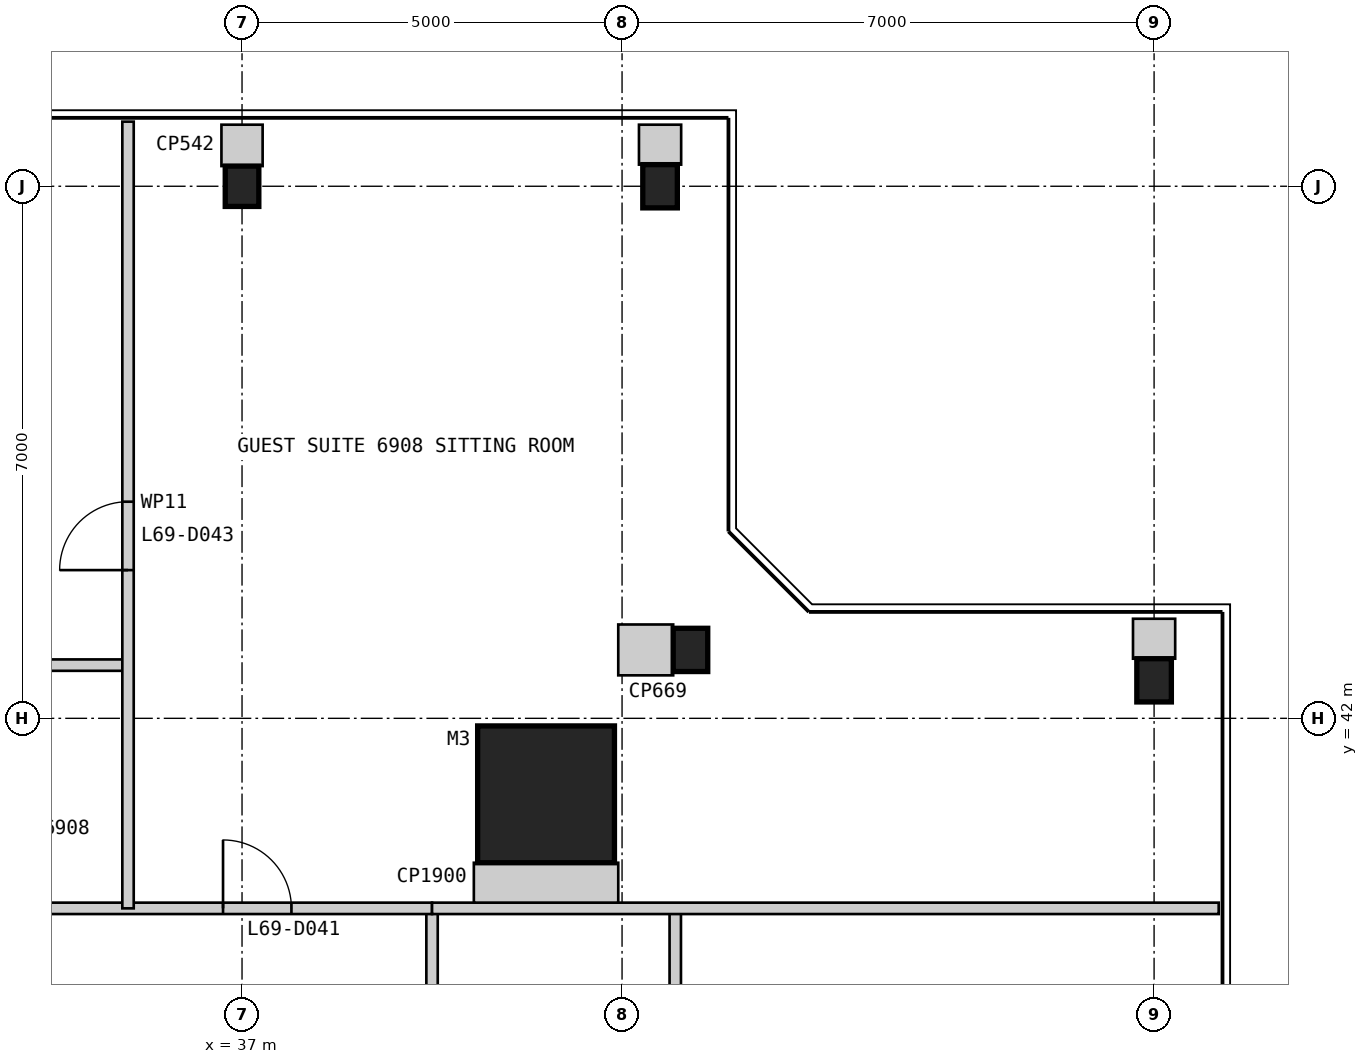
"""IFC4 building model, lengths in metres.
Left out: names, types, materials, properties, quantities, classifications, styles, units other than length and angle.
Written with IfcOpenShell. Run it as: python <this file> out.ifc"""

import sys

from ifc_helpers import new_model, si_unit, direction, frame, frame_2d, origin, origin_2d, place, context, subcontext, project, spatial, rectangle, i_section, extrude, element, fill, save


model = new_model("IFC4")
c1 = context("Model", 3, precision=1e-05, world=origin(), true_north=direction((0.0, 1.0)))
c2 = subcontext(c1, "Body", "Model", "MODEL_VIEW")
j1 = project(units=[si_unit("LENGTHUNIT", "METRE"), si_unit("PLANEANGLEUNIT", "RADIAN")], contexts=[c1])
p1 = place(None, origin())
s1 = spatial("IfcSite", under=j1, at=p1, CompositionType="ELEMENT")
p2 = place(p1, origin())
s2 = spatial("IfcBuilding", under=s1, at=p2, CompositionType="ELEMENT")
p3 = place(p2, frame((0.0, 0.0, 286.6)))
s3 = spatial("IfcBuildingStorey", under=s2, at=p3, CompositionType="ELEMENT", Elevation=286.6)
p4 = place(p3, frame((41.0, 41.0, 0.0), z_axis=(0.0, 0.0, 1.0), x_axis=(1.0, 0.0, 0.0)))
e1 = element("IfcColumn", 1, at=p4, inside=s3, PredefinedType="COLUMN", context=c2, shape_type="SweptSolid", body=[
    extrude(rectangle(XDim=1.8, YDim=1.8, at=origin_2d()), origin(), (0.0, 0.0, 1.0), 3.4),
])
for number, where, z_axis, x_axis in (
    (2, (49.0, 42.5, 0.0), (0.0, 0.0, 1.0), (1.0, 0.0, 0.0)),
    (3, (42.9, 42.9, 0.0), (0.0, 0.0, 1.0), (1.0, 0.0, 0.0)),
    (4, (42.5, 49.0, 0.0), (0.0, 0.0, 1.0), (1.0, 0.0, 0.0)),
):
    element("IfcColumn", number, at=place(p3, frame(where, z_axis=z_axis, x_axis=x_axis)), inside=s3, PredefinedType="COLUMN", context=c2, shape_type="SweptSolid", body=[
        extrude(i_section(OverallWidth=0.455, OverallDepth=0.569, WebThickness=0.078, FlangeThickness=0.125, at=origin_2d()), origin(), (0.0, 0.0, 1.0), 3.4),
    ])
p5 = place(p3, frame((37.0, 49.0, 0.0), z_axis=(0.0, 0.0, 1.0), x_axis=(1.0, 0.0, 0.0)))
e5 = element("IfcColumn", 5, at=p5, inside=s3, PredefinedType="COLUMN", context=c2, shape_type="SweptSolid", body=[
    extrude(i_section(OverallWidth=0.442, OverallDepth=0.531, WebThickness=0.066, FlangeThickness=0.106, at=origin_2d()), origin(), (0.0, 0.0, 1.0), 3.4),
])
p6 = place(p3, frame((39.5, 10.5, 0.0), z_axis=(0.0, 0.0, 1.0), x_axis=(0.0, 1.0, 0.0)))
e6 = element("IfcWall", 6, at=p6, inside=s3, PredefinedType="PARTITIONING", context=c2, shape_type="SweptSolid", body=[
    extrude(rectangle(XDim=29.0, YDim=0.15, at=frame_2d((14.5, 0.0))), origin(), (0.0, 0.0, 1.0), 3.25),
])
p7 = place(p6, frame((2.775, 0.0, 0.0)))
e7 = element("IfcOpeningElement", 7, at=p7, cuts=e6, PredefinedType="OPENING", context=c2, shape_type="SweptSolid", body=[
    extrude(rectangle(XDim=0.9, YDim=2.1, at=frame_2d((0.45, 1.05))), frame((0.0, 0.085, 0.0), z_axis=(0.0, -1.0, 0.0), x_axis=(1.0, 0.0, 0.0)), (0.0, 0.0, 1.0), 0.17),
])
p8 = place(p6, frame((11.1, 0.0, 0.0)))
e8 = element("IfcOpeningElement", 8, at=p8, cuts=e6, PredefinedType="OPENING", context=c2, shape_type="SweptSolid", body=[
    extrude(rectangle(XDim=0.9, YDim=2.1, at=frame_2d((0.45, 1.05))), frame((0.0, 0.085, 0.0), z_axis=(0.0, -1.0, 0.0), x_axis=(1.0, 0.0, 0.0)), (0.0, 0.0, 1.0), 0.17),
])
p9 = place(p6, frame((17.2, 0.0, 0.0)))
e9 = element("IfcOpeningElement", 9, at=p9, cuts=e6, PredefinedType="OPENING", context=c2, shape_type="SweptSolid", body=[
    extrude(rectangle(XDim=1.0, YDim=2.1, at=frame_2d((0.5, 1.05))), frame((0.0, 0.085, 0.0), z_axis=(0.0, -1.0, 0.0), x_axis=(1.0, 0.0, 0.0)), (0.0, 0.0, 1.0), 0.17),
])
p10 = place(p6, frame((24.5, 0.0, 0.0)))
e10 = element("IfcOpeningElement", 10, at=p10, cuts=e6, PredefinedType="OPENING", context=c2, shape_type="SweptSolid", body=[
    extrude(rectangle(XDim=0.9, YDim=2.1, at=frame_2d((0.45, 1.05))), frame((0.0, 0.085, 0.0), z_axis=(0.0, -1.0, 0.0), x_axis=(1.0, 0.0, 0.0)), (0.0, 0.0, 1.0), 0.17),
])
p11 = place(p3, frame((42.7, 36.5, 0.0), z_axis=(0.0, 0.0, 1.0), x_axis=(0.0, 1.0, 0.0)))
e11 = element("IfcWall", 11, at=p11, inside=s3, PredefinedType="PARTITIONING", context=c2, shape_type="SweptSolid", body=[
    extrude(rectangle(XDim=3.0, YDim=0.15, at=frame_2d((1.5, 0.0))), origin(), (0.0, 0.0, 1.0), 3.25),
])
p12 = place(p3, frame((39.5, 39.5, 0.0), z_axis=(0.0, 0.0, 1.0), x_axis=(-1.0, 0.0, 0.0)))
e12 = element("IfcWall", 12, at=p12, inside=s3, PredefinedType="PARTITIONING", context=c2, shape_type="SweptSolid", body=[
    extrude(rectangle(XDim=29.0, YDim=0.15, at=frame_2d((14.5, 0.0))), origin(), (0.0, 0.0, 1.0), 3.25),
])
p13 = place(p12, frame((1.85, 0.0, 0.0)))
e13 = element("IfcOpeningElement", 13, at=p13, cuts=e12, PredefinedType="OPENING", context=c2, shape_type="SweptSolid", body=[
    extrude(rectangle(XDim=0.9, YDim=2.1, at=frame_2d((0.45, 1.05))), frame((0.0, 0.085, 0.0), z_axis=(0.0, -1.0, 0.0), x_axis=(1.0, 0.0, 0.0)), (0.0, 0.0, 1.0), 0.17),
])
p14 = place(p12, frame((11.5, 0.0, 0.0)))
e14 = element("IfcOpeningElement", 14, at=p14, cuts=e12, PredefinedType="OPENING", context=c2, shape_type="SweptSolid", body=[
    extrude(rectangle(XDim=0.9, YDim=2.1, at=frame_2d((0.45, 1.05))), frame((0.0, 0.085, 0.0), z_axis=(0.0, -1.0, 0.0), x_axis=(1.0, 0.0, 0.0)), (0.0, 0.0, 1.0), 0.17),
])
p15 = place(p12, frame((24.1, 0.0, 0.0)))
e15 = element("IfcOpeningElement", 15, at=p15, cuts=e12, PredefinedType="OPENING", context=c2, shape_type="SweptSolid", body=[
    extrude(rectangle(XDim=0.9, YDim=2.1, at=frame_2d((0.45, 1.05))), frame((0.0, 0.085, 0.0), z_axis=(0.0, -1.0, 0.0), x_axis=(1.0, 0.0, 0.0)), (0.0, 0.0, 1.0), 0.17),
])
p16 = place(p3, frame((49.85, 39.5, 0.0), z_axis=(0.0, 0.0, 1.0), x_axis=(-1.0, 0.0, 0.0)))
e16 = element("IfcWall", 16, at=p16, inside=s3, PredefinedType="PARTITIONING", context=c2, shape_type="SweptSolid", body=[
    extrude(rectangle(XDim=10.35, YDim=0.15, at=frame_2d((5.175, 0.0))), origin(), (0.0, 0.0, 1.0), 3.25),
])
p17 = place(p3, frame((35.5, 42.7, 0.0), z_axis=(0.0, 0.0, 1.0), x_axis=(-1.0, 0.0, 0.0)))
e17 = element("IfcWall", 17, at=p17, inside=s3, PredefinedType="PARTITIONING", context=c2, shape_type="SweptSolid", body=[
    extrude(rectangle(XDim=3.0, YDim=0.15, at=frame_2d((1.5, 0.0))), origin(), (0.0, 0.0, 1.0), 3.25),
])
p18 = place(p3, frame((35.5, 49.85, 0.0), z_axis=(0.0, 0.0, 1.0), x_axis=(0.0, -1.0, 0.0)))
e18 = element("IfcWall", 18, at=p18, inside=s3, PredefinedType="PARTITIONING", context=c2, shape_type="SweptSolid", body=[
    extrude(rectangle(XDim=10.35, YDim=0.15, at=frame_2d((5.175, 0.0))), origin(), (0.0, 0.0, 1.0), 3.25),
])
p19 = place(p18, frame((5.0, 0.0, 0.0)))
e19 = element("IfcOpeningElement", 19, at=p19, cuts=e18, PredefinedType="OPENING", context=c2, shape_type="SweptSolid", body=[
    extrude(rectangle(XDim=0.9, YDim=2.1, at=frame_2d((0.45, 1.05))), frame((0.0, 0.085, 0.0), z_axis=(0.0, -1.0, 0.0), x_axis=(1.0, 0.0, 0.0)), (0.0, 0.0, 1.0), 0.17),
])
p20 = place(p3, frame((41.0, 39.575, 0.0), z_axis=(0.0, 0.0, 1.0), x_axis=(0.0, 1.0, 0.0)))
e20 = element("IfcWall", 20, at=p20, inside=s3, PredefinedType="PARTITIONING", context=c2, shape_type="SweptSolid", body=[
    extrude(rectangle(XDim=0.525, YDim=1.9, at=frame_2d((0.263, 0.0))), origin(), (0.0, 0.0, 1.0), 3.25),
])
p21 = place(p3, frame((49.0, 43.31, 0.0), z_axis=(0.0, 0.0, 1.0), x_axis=(0.0, -1.0, 0.0)))
e21 = element("IfcWall", 21, at=p21, inside=s3, PredefinedType="PARTITIONING", context=c2, shape_type="SweptSolid", body=[
    extrude(rectangle(XDim=0.526, YDim=0.555, at=frame_2d((0.263, 0.0))), origin(), (0.0, 0.0, 1.0), 3.25),
])
p22 = place(p3, frame((41.95, 42.9, 0.0), z_axis=(0.0, 0.0, 1.0), x_axis=(1.0, 0.0, 0.0)))
e22 = element("IfcWall", 22, at=p22, inside=s3, PredefinedType="PARTITIONING", context=c2, shape_type="SweptSolid", body=[
    extrude(rectangle(XDim=0.723, YDim=0.669, at=frame_2d((0.361, 0.0))), origin(), (0.0, 0.0, 1.0), 3.25),
])
p23 = place(p3, frame((42.5, 49.81, 0.0), z_axis=(0.0, 0.0, 1.0), x_axis=(0.0, -1.0, 0.0)))
e23 = element("IfcWall", 23, at=p23, inside=s3, PredefinedType="PARTITIONING", context=c2, shape_type="SweptSolid", body=[
    extrude(rectangle(XDim=0.526, YDim=0.555, at=frame_2d((0.263, 0.0))), origin(), (0.0, 0.0, 1.0), 3.25),
])
p24 = place(p3, frame((37.0, 49.81, 0.0), z_axis=(0.0, 0.0, 1.0), x_axis=(0.0, -1.0, 0.0)))
e24 = element("IfcWall", 24, at=p24, inside=s3, PredefinedType="PARTITIONING", context=c2, shape_type="SweptSolid", body=[
    extrude(rectangle(XDim=0.545, YDim=0.542, at=frame_2d((0.272, 0.0))), origin(), (0.0, 0.0, 1.0), 3.25),
])
p25 = place(p13, frame((0.9, 0.0, 0.0), z_axis=(0.0, 0.0, 1.0), x_axis=(-1.0, 0.0, 0.0)))
e25 = element("IfcDoor", 25, at=p25, inside=s3, OperationType="SINGLE_SWING_LEFT", PredefinedType="DOOR", context=c2, shape_type="SweptSolid", body=[
    extrude(rectangle(XDim=0.9, YDim=2.1, at=frame_2d((0.45, 1.05))), frame((0.0, 0.025, 0.0), z_axis=(0.0, -1.0, 0.0), x_axis=(1.0, 0.0, 0.0)), (0.0, 0.0, 1.0), 0.05),
])
fill(e13, e25)
p26 = place(p19, frame((0.9, 0.0, 0.0), z_axis=(0.0, 0.0, 1.0), x_axis=(-1.0, 0.0, 0.0)))
e26 = element("IfcDoor", 26, at=p26, inside=s3, OperationType="SINGLE_SWING_LEFT", PredefinedType="DOOR", context=c2, shape_type="SweptSolid", body=[
    extrude(rectangle(XDim=0.9, YDim=2.1, at=frame_2d((0.45, 1.05))), frame((0.0, 0.025, 0.0), z_axis=(0.0, -1.0, 0.0), x_axis=(1.0, 0.0, 0.0)), (0.0, 0.0, 1.0), 0.05),
])
fill(e19, e26)
save(model, sys.argv[1])
